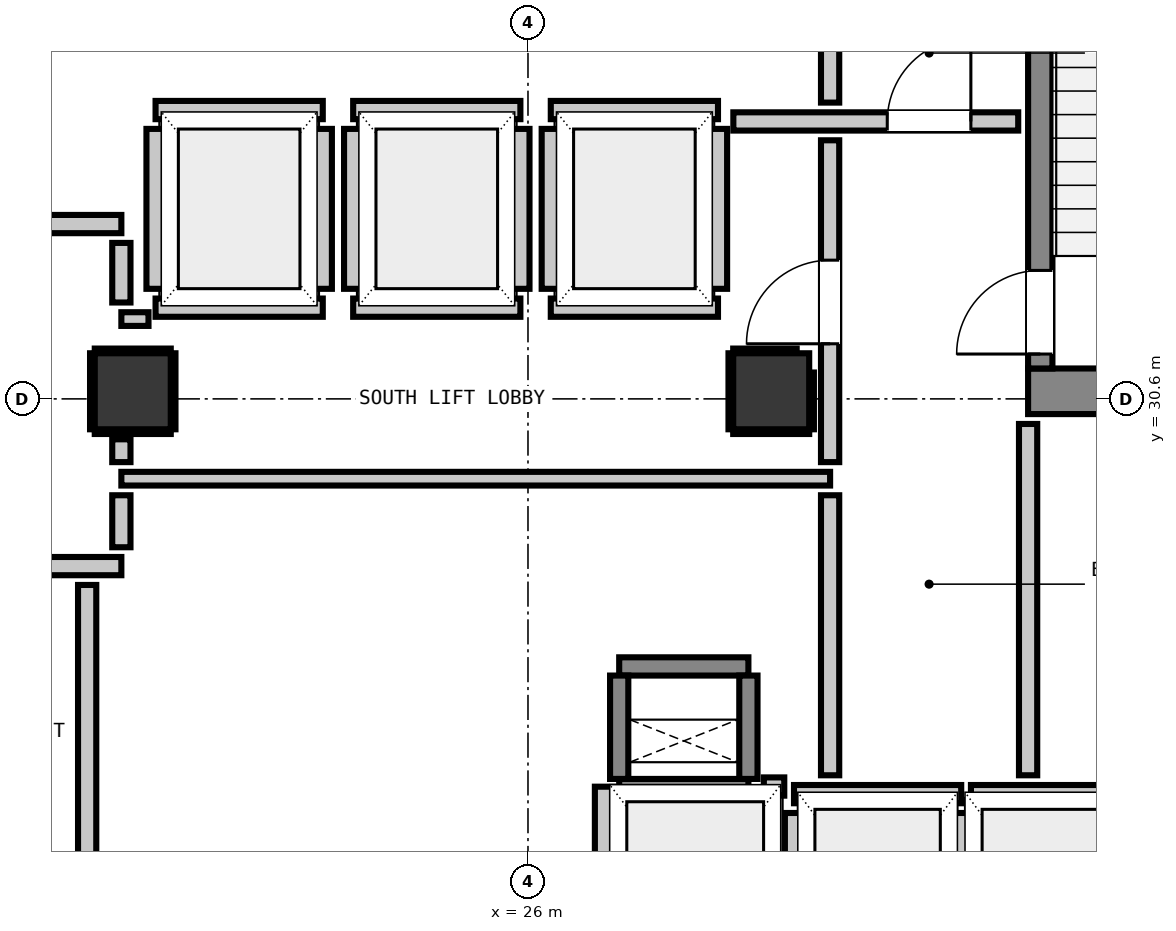
"""IFC4 building model, lengths in metres.
Left out: names, types, materials, properties, quantities, classifications, styles, units other than length and angle.
Written with IfcOpenShell. Run it as: python <this file> out.ifc"""

import sys

from ifc_helpers import new_model, si_unit, direction, frame, frame_2d, origin, origin_2d, place, context, subcontext, project, spatial, rectangle, extrude, element, fill, save


model = new_model("IFC4")
c1 = context("Model", 3, precision=1e-05, world=origin(), true_north=direction((0.0, 1.0)))
c2 = subcontext(c1, "Body", "Model", "MODEL_VIEW")
j1 = project(units=[si_unit("LENGTHUNIT", "METRE"), si_unit("PLANEANGLEUNIT", "RADIAN")], contexts=[c1])
p1 = place(None, origin())
s1 = spatial("IfcSite", under=j1, at=p1, CompositionType="ELEMENT")
p2 = place(p1, origin())
s2 = spatial("IfcBuilding", under=s1, at=p2, CompositionType="ELEMENT")
p3 = place(p2, frame((0.0, 0.0, 112.72)))
s3 = spatial("IfcBuildingStorey", under=s2, at=p3, CompositionType="ELEMENT", Elevation=112.72)
p4 = place(p3, frame((32.58, 30.7, 0.0), z_axis=(0.0, 0.0, 1.0), x_axis=(1.0, 0.0, 0.0)))
e1 = element("IfcWall", 1, at=p4, inside=s3, PredefinedType="SHEAR", context=c2, shape_type="SweptSolid", body=[
    extrude(rectangle(XDim=3.415, YDim=0.6, at=frame_2d((1.708, 0.0))), origin(), (0.0, 0.0, 1.0), 3.32),
])
p5 = place(p3, frame((32.74, 31.0, 0.0), z_axis=(0.0, 0.0, 1.0), x_axis=(0.0, 1.0, 0.0)))
e2 = element("IfcWall", 2, at=p5, inside=s3, PredefinedType="SHEAR", context=c2, shape_type="SweptSolid", body=[
    extrude(rectangle(XDim=7.8, YDim=0.32, at=frame_2d((3.9, 0.0))), origin(), (0.0, 0.0, 1.0), 3.32),
])
p6 = place(p5, frame((0.19, 0.0, 0.0)))
e3 = element("IfcOpeningElement", 3, at=p6, cuts=e2, PredefinedType="OPENING", context=c2, shape_type="SweptSolid", body=[
    extrude(rectangle(XDim=1.1, YDim=2.15, at=frame_2d((0.55, 1.075))), frame((0.0, 0.17, 0.0), z_axis=(0.0, -1.0, 0.0), x_axis=(1.0, 0.0, 0.0)), (0.0, 0.0, 1.0), 0.34),
])
for number, where, z_axis, x_axis in (
    (4, (27.2, 25.48, 0.0), (0.0, 0.0, 1.0), (1.0, 0.0, 0.0)),
    (5, (27.2, 27.08, 0.0), (0.0, 0.0, 1.0), (1.0, 0.0, 0.0)),
):
    element("IfcWall", number, at=place(p3, frame(where, z_axis=z_axis, x_axis=x_axis)), inside=s3, PredefinedType="SHEAR", context=c2, shape_type="SweptSolid", body=[
        extrude(rectangle(XDim=1.7, YDim=0.24, at=frame_2d((0.85, 0.0))), origin(), (0.0, 0.0, 1.0), 3.32),
    ])
for number, where, z_axis, x_axis in (
    (6, (27.2, 25.6, 0.0), (0.0, 0.0, 1.0), (0.0, 1.0, 0.0)),
    (7, (28.9, 25.6, 0.0), (0.0, 0.0, 1.0), (0.0, 1.0, 0.0)),
):
    element("IfcWall", number, at=place(p3, frame(where, z_axis=z_axis, x_axis=x_axis)), inside=s3, PredefinedType="SHEAR", context=c2, shape_type="SweptSolid", body=[
        extrude(rectangle(XDim=1.36, YDim=0.24, at=frame_2d((0.68, 0.0))), origin(), (0.0, 0.0, 1.0), 3.32),
    ])
for number, where, z_axis, x_axis in (
    (8, (20.8, 30.7, 0.0), (0.0, 0.0, 1.0), (1.0, 0.0, 0.0)),
    (9, (29.2, 30.7, 0.0), (0.0, 0.0, 1.0), (1.0, 0.0, 0.0)),
):
    element("IfcColumn", number, at=place(p3, frame(where, z_axis=z_axis, x_axis=x_axis)), inside=s3, PredefinedType="COLUMN", context=c2, shape_type="SweptSolid", body=[
        extrude(rectangle(XDim=1.0, YDim=1.0, at=origin_2d()), origin(), (0.0, 0.0, 1.0), 3.32),
    ])
for number, where, z_axis, x_axis in (
    (10, (21.1, 31.8, 0.0), (0.0, 0.0, 1.0), (1.0, 0.0, 0.0)),
    (11, (21.1, 34.4, 0.0), (0.0, 0.0, 1.0), (1.0, 0.0, 0.0)),
):
    element("IfcWall", number, at=place(p3, frame(where, z_axis=z_axis, x_axis=x_axis)), inside=s3, PredefinedType="PARTITIONING", context=c2, shape_type="SweptSolid", body=[
        extrude(rectangle(XDim=2.2, YDim=0.24, at=frame_2d((1.1, 0.0))), origin(), (0.0, 0.0, 1.0), 3.08),
    ])
p7 = place(p3, frame((21.1, 32.048, 0.0), z_axis=(0.0, 0.0, 1.0), x_axis=(0.0, 1.0, 0.0)))
e12 = element("IfcWall", 12, at=p7, inside=s3, PredefinedType="PARTITIONING", context=c2, shape_type="SweptSolid", body=[
    extrude(rectangle(XDim=2.104, YDim=0.24, at=frame_2d((1.052, 0.0))), origin(), (0.0, 0.0, 1.0), 2.315),
])
p8 = place(p3, frame((23.3, 32.048, 0.0), z_axis=(0.0, 0.0, 1.0), x_axis=(0.0, 1.0, 0.0)))
e13 = element("IfcWall", 13, at=p8, inside=s3, PredefinedType="PARTITIONING", context=c2, shape_type="SweptSolid", body=[
    extrude(rectangle(XDim=2.104, YDim=0.24, at=frame_2d((1.052, 0.0))), origin(), (0.0, 0.0, 1.0), 3.08),
])
for number, where, z_axis, x_axis in (
    (14, (23.7, 31.8, 0.0), (0.0, 0.0, 1.0), (1.0, 0.0, 0.0)),
    (15, (23.7, 34.4, 0.0), (0.0, 0.0, 1.0), (1.0, 0.0, 0.0)),
):
    element("IfcWall", number, at=place(p3, frame(where, z_axis=z_axis, x_axis=x_axis)), inside=s3, PredefinedType="PARTITIONING", context=c2, shape_type="SweptSolid", body=[
        extrude(rectangle(XDim=2.2, YDim=0.24, at=frame_2d((1.1, 0.0))), origin(), (0.0, 0.0, 1.0), 3.08),
    ])
for number, where, z_axis, x_axis in (
    (16, (23.7, 32.048, 0.0), (0.0, 0.0, 1.0), (0.0, 1.0, 0.0)),
    (17, (25.9, 32.048, 0.0), (0.0, 0.0, 1.0), (0.0, 1.0, 0.0)),
):
    element("IfcWall", number, at=place(p3, frame(where, z_axis=z_axis, x_axis=x_axis)), inside=s3, PredefinedType="PARTITIONING", context=c2, shape_type="SweptSolid", body=[
        extrude(rectangle(XDim=2.104, YDim=0.24, at=frame_2d((1.052, 0.0))), origin(), (0.0, 0.0, 1.0), 3.08),
    ])
for number, where, z_axis, x_axis in (
    (18, (26.3, 31.8, 0.0), (0.0, 0.0, 1.0), (1.0, 0.0, 0.0)),
    (19, (26.3, 34.4, 0.0), (0.0, 0.0, 1.0), (1.0, 0.0, 0.0)),
):
    element("IfcWall", number, at=place(p3, frame(where, z_axis=z_axis, x_axis=x_axis)), inside=s3, PredefinedType="PARTITIONING", context=c2, shape_type="SweptSolid", body=[
        extrude(rectangle(XDim=2.2, YDim=0.24, at=frame_2d((1.1, 0.0))), origin(), (0.0, 0.0, 1.0), 3.08),
    ])
for number, where, z_axis, x_axis in (
    (20, (26.3, 32.048, 0.0), (0.0, 0.0, 1.0), (0.0, 1.0, 0.0)),
    (21, (28.5, 32.048, 0.0), (0.0, 0.0, 1.0), (0.0, 1.0, 0.0)),
):
    element("IfcWall", number, at=place(p3, frame(where, z_axis=z_axis, x_axis=x_axis)), inside=s3, PredefinedType="PARTITIONING", context=c2, shape_type="SweptSolid", body=[
        extrude(rectangle(XDim=2.104, YDim=0.24, at=frame_2d((1.052, 0.0))), origin(), (0.0, 0.0, 1.0), 3.08),
    ])
p9 = place(p3, frame((29.5, 25.4, 0.0), z_axis=(0.0, 0.0, 1.0), x_axis=(1.0, 0.0, 0.0)))
e22 = element("IfcWall", 22, at=p9, inside=s3, PredefinedType="PARTITIONING", context=c2, shape_type="SweptSolid", body=[
    extrude(rectangle(XDim=2.2, YDim=0.24, at=frame_2d((1.1, 0.0))), origin(), (0.0, 0.0, 1.0), 3.08),
])
p10 = place(p3, frame((29.5, 22.632, 0.0), z_axis=(0.0, 0.0, 1.0), x_axis=(0.0, 1.0, 0.0)))
e23 = element("IfcWall", 23, at=p10, inside=s3, PredefinedType="PARTITIONING", context=c2, shape_type="SweptSolid", body=[
    extrude(rectangle(XDim=2.52, YDim=0.24, at=frame_2d((1.26, 0.0))), origin(), (0.0, 0.0, 1.0), 2.315),
])
p11 = place(p3, frame((31.7, 22.63, 0.0), z_axis=(0.0, 0.0, 1.0), x_axis=(0.0, 1.0, 0.0)))
e24 = element("IfcWall", 24, at=p11, inside=s3, PredefinedType="PARTITIONING", context=c2, shape_type="SweptSolid", body=[
    extrude(rectangle(XDim=2.522, YDim=0.24, at=frame_2d((1.261, 0.0))), origin(), (0.0, 0.0, 1.0), 3.08),
])
p12 = place(p3, frame((31.828, 25.4, 0.0), z_axis=(0.0, 0.0, 1.0), x_axis=(1.0, 0.0, 0.0)))
e25 = element("IfcWall", 25, at=p12, inside=s3, PredefinedType="PARTITIONING", context=c2, shape_type="SweptSolid", body=[
    extrude(rectangle(XDim=2.072, YDim=0.24, at=frame_2d((1.036, 0.0))), origin(), (0.0, 0.0, 1.0), 3.08),
])
p13 = place(p3, frame((29.103, 25.5, 0.0), z_axis=(0.0, 0.0, 1.0), x_axis=(1.0, 0.0, 0.0)))
e26 = element("IfcWall", 26, at=p13, inside=s3, PredefinedType="PARTITIONING", context=c2, shape_type="SweptSolid", body=[
    extrude(rectangle(XDim=0.269, YDim=0.24, at=frame_2d((0.135, 0.0))), origin(), (0.0, 0.0, 1.0), 3.08),
])
p14 = place(p3, frame((27.0, 22.63, 0.0), z_axis=(0.0, 0.0, 1.0), x_axis=(0.0, 1.0, 0.0)))
e27 = element("IfcWall", 27, at=p14, inside=s3, PredefinedType="PARTITIONING", context=c2, shape_type="SweptSolid", body=[
    extrude(rectangle(XDim=2.868, YDim=0.24, at=frame_2d((1.434, 0.0))), origin(), (0.0, 0.0, 1.0), 3.08),
])
p15 = place(p3, frame((17.45, 28.4, 0.0), z_axis=(0.0, 0.0, 1.0), x_axis=(1.0, 0.0, 0.0)))
e28 = element("IfcWall", 28, at=p15, inside=s3, PredefinedType="PARTITIONING", context=c2, shape_type="SweptSolid", body=[
    extrude(rectangle(XDim=3.2, YDim=0.24, at=frame_2d((1.6, 0.0))), origin(), (0.0, 0.0, 1.0), 3.08),
])
p16 = place(p15, frame((0.784, 0.0, 0.0)))
e29 = element("IfcOpeningElement", 29, at=p16, cuts=e28, PredefinedType="OPENING", context=c2, shape_type="SweptSolid", body=[
    extrude(rectangle(XDim=1.1, YDim=2.15, at=frame_2d((0.55, 1.075))), frame((0.0, 0.13, 0.0), z_axis=(0.0, -1.0, 0.0), x_axis=(1.0, 0.0, 0.0)), (0.0, 0.0, 1.0), 0.26),
])
p17 = place(p3, frame((17.45, 32.9, 0.0), z_axis=(0.0, 0.0, 1.0), x_axis=(1.0, 0.0, 0.0)))
e30 = element("IfcWall", 30, at=p17, inside=s3, PredefinedType="PARTITIONING", context=c2, shape_type="SweptSolid", body=[
    extrude(rectangle(XDim=3.2, YDim=0.24, at=frame_2d((1.6, 0.0))), origin(), (0.0, 0.0, 1.0), 3.08),
])
p18 = place(p17, frame((0.159, 0.0, 0.0)))
e31 = element("IfcOpeningElement", 31, at=p18, cuts=e30, PredefinedType="OPENING", context=c2, shape_type="SweptSolid", body=[
    extrude(rectangle(XDim=1.1, YDim=2.15, at=frame_2d((0.55, 1.075))), frame((0.0, 0.13, 0.0), z_axis=(0.0, -1.0, 0.0), x_axis=(1.0, 0.0, 0.0)), (0.0, 0.0, 1.0), 0.26),
])
p19 = place(p3, frame((28.702, 34.25, 0.0), z_axis=(0.0, 0.0, 1.0), x_axis=(1.0, 0.0, 0.0)))
e32 = element("IfcWall", 32, at=p19, inside=s3, PredefinedType="PARTITIONING", context=c2, shape_type="SweptSolid", body=[
    extrude(rectangle(XDim=3.748, YDim=0.24, at=frame_2d((1.874, 0.0))), origin(), (0.0, 0.0, 1.0), 3.08),
])
p20 = place(p19, frame((2.025, 0.0, 0.0)))
e33 = element("IfcOpeningElement", 33, at=p20, cuts=e32, PredefinedType="OPENING", context=c2, shape_type="SweptSolid", body=[
    extrude(rectangle(XDim=1.1, YDim=2.15, at=frame_2d((0.55, 1.075))), frame((0.0, 0.13, 0.0), z_axis=(0.0, -1.0, 0.0), x_axis=(1.0, 0.0, 0.0)), (0.0, 0.0, 1.0), 0.26),
])
p21 = place(p3, frame((20.65, 29.55, 0.0), z_axis=(0.0, 0.0, 1.0), x_axis=(1.0, 0.0, 0.0)))
e34 = element("IfcWall", 34, at=p21, inside=s3, PredefinedType="PARTITIONING", context=c2, shape_type="SweptSolid", body=[
    extrude(rectangle(XDim=9.325, YDim=0.18, at=frame_2d((4.663, 0.0))), origin(), (0.0, 0.0, 1.0), 3.08),
])
p22 = place(p3, frame((20.65, 31.65, 0.0), z_axis=(0.0, 0.0, 1.0), x_axis=(1.0, 0.0, 0.0)))
e35 = element("IfcWall", 35, at=p22, inside=s3, PredefinedType="PARTITIONING", context=c2, shape_type="SweptSolid", body=[
    extrude(rectangle(XDim=0.357, YDim=0.18, at=frame_2d((0.179, 0.0))), origin(), (0.0, 0.0, 1.0), 3.08),
])
p23 = place(p3, frame((20.2, 22.586, 0.0), z_axis=(0.0, 0.0, 1.0), x_axis=(0.0, 1.0, 0.0)))
e36 = element("IfcWall", 36, at=p23, inside=s3, PredefinedType="PARTITIONING", context=c2, shape_type="SweptSolid", body=[
    extrude(rectangle(XDim=5.566, YDim=0.24, at=frame_2d((2.783, 0.0))), origin(), (0.0, 0.0, 1.0), 3.08),
])
p24 = place(p3, frame((20.65, 28.648, 0.0), z_axis=(0.0, 0.0, 1.0), x_axis=(0.0, 1.0, 0.0)))
e37 = element("IfcWall", 37, at=p24, inside=s3, PredefinedType="PARTITIONING", context=c2, shape_type="SweptSolid", body=[
    extrude(rectangle(XDim=0.684, YDim=0.24, at=frame_2d((0.342, 0.0))), origin(), (0.0, 0.0, 1.0), 2.315),
])
p25 = place(p3, frame((20.65, 29.768, 0.0), z_axis=(0.0, 0.0, 1.0), x_axis=(0.0, 1.0, 0.0)))
e38 = element("IfcWall", 38, at=p25, inside=s3, PredefinedType="PARTITIONING", context=c2, shape_type="SweptSolid", body=[
    extrude(rectangle(XDim=0.3, YDim=0.24, at=frame_2d((0.15, 0.0))), origin(), (0.0, 0.0, 1.0), 2.315),
])
p26 = place(p3, frame((20.65, 31.868, 0.0), z_axis=(0.0, 0.0, 1.0), x_axis=(0.0, 1.0, 0.0)))
e39 = element("IfcWall", 39, at=p26, inside=s3, PredefinedType="PARTITIONING", context=c2, shape_type="SweptSolid", body=[
    extrude(rectangle(XDim=0.784, YDim=0.24, at=frame_2d((0.392, 0.0))), origin(), (0.0, 0.0, 1.0), 2.315),
])
p27 = place(p3, frame((29.975, 25.648, 0.0), z_axis=(0.0, 0.0, 1.0), x_axis=(0.0, 1.0, 0.0)))
e40 = element("IfcWall", 40, at=p27, inside=s3, PredefinedType="PARTITIONING", context=c2, shape_type="SweptSolid", body=[
    extrude(rectangle(XDim=3.684, YDim=0.24, at=frame_2d((1.842, 0.0))), origin(), (0.0, 0.0, 1.0), 3.08),
])
p28 = place(p3, frame((29.975, 29.768, 0.0), z_axis=(0.0, 0.0, 1.0), x_axis=(0.0, 1.0, 0.0)))
e41 = element("IfcWall", 41, at=p28, inside=s3, PredefinedType="PARTITIONING", context=c2, shape_type="SweptSolid", body=[
    extrude(rectangle(XDim=4.234, YDim=0.24, at=frame_2d((2.117, 0.0))), origin(), (0.0, 0.0, 1.0), 3.08),
])
p29 = place(p28, frame((1.557, 0.0, 0.0)))
e42 = element("IfcOpeningElement", 42, at=p29, cuts=e41, PredefinedType="OPENING", context=c2, shape_type="SweptSolid", body=[
    extrude(rectangle(XDim=1.1, YDim=2.15, at=frame_2d((0.55, 1.075))), frame((0.0, 0.13, 0.0), z_axis=(0.0, -1.0, 0.0), x_axis=(1.0, 0.0, 0.0)), (0.0, 0.0, 1.0), 0.26),
])
p30 = place(p3, frame((29.975, 34.498, 0.0), z_axis=(0.0, 0.0, 1.0), x_axis=(0.0, 1.0, 0.0)))
e43 = element("IfcWall", 43, at=p30, inside=s3, PredefinedType="PARTITIONING", context=c2, shape_type="SweptSolid", body=[
    extrude(rectangle(XDim=0.964, YDim=0.24, at=frame_2d((0.482, 0.0))), origin(), (0.0, 0.0, 1.0), 3.08),
])
p31 = place(p3, frame((32.58, 25.648, 0.0), z_axis=(0.0, 0.0, 1.0), x_axis=(0.0, 1.0, 0.0)))
e44 = element("IfcWall", 44, at=p31, inside=s3, PredefinedType="PARTITIONING", context=c2, shape_type="SweptSolid", body=[
    extrude(rectangle(XDim=4.622, YDim=0.24, at=frame_2d((2.311, 0.0))), origin(), (0.0, 0.0, 1.0), 3.08),
])
for number, where, z_axis, x_axis in (
    (45, (20.3, 30.168, 0.0), (0.0, 0.0, 1.0), (1.0, 0.0, 0.0)),
    (46, (20.3, 31.232, 0.0), (0.0, 0.0, 1.0), (1.0, 0.0, 0.0)),
    (47, (20.268, 30.2, 0.0), (0.0, 0.0, 1.0), (0.0, 1.0, 0.0)),
    (48, (21.332, 30.2, 0.0), (0.0, 0.0, 1.0), (0.0, 1.0, 0.0)),
    (49, (28.7, 30.168, 0.0), (0.0, 0.0, 1.0), (1.0, 0.0, 0.0)),
):
    element("IfcWall", number, at=place(p3, frame(where, z_axis=z_axis, x_axis=x_axis)), inside=s3, PredefinedType="PARTITIONING", context=c2, shape_type="SweptSolid", body=[
        extrude(rectangle(XDim=1.0, YDim=0.06, at=frame_2d((0.5, 0.0))), origin(), (0.0, 0.0, 1.0), 1.45),
    ])
p32 = place(p3, frame((28.7, 31.232, 0.0), z_axis=(0.0, 0.0, 1.0), x_axis=(1.0, 0.0, 0.0)))
e50 = element("IfcWall", 50, at=p32, inside=s3, PredefinedType="PARTITIONING", context=c2, shape_type="SweptSolid", body=[
    extrude(rectangle(XDim=0.835, YDim=0.06, at=frame_2d((0.417, 0.0))), origin(), (0.0, 0.0, 1.0), 1.45),
])
p33 = place(p3, frame((28.668, 30.2, 0.0), z_axis=(0.0, 0.0, 1.0), x_axis=(0.0, 1.0, 0.0)))
e51 = element("IfcWall", 51, at=p33, inside=s3, PredefinedType="PARTITIONING", context=c2, shape_type="SweptSolid", body=[
    extrude(rectangle(XDim=1.0, YDim=0.06, at=frame_2d((0.5, 0.0))), origin(), (0.0, 0.0, 1.0), 1.45),
])
p34 = place(p3, frame((29.732, 30.2, 0.0), z_axis=(0.0, 0.0, 1.0), x_axis=(0.0, 1.0, 0.0)))
e52 = element("IfcWall", 52, at=p34, inside=s3, PredefinedType="PARTITIONING", context=c2, shape_type="SweptSolid", body=[
    extrude(rectangle(XDim=0.747, YDim=0.06, at=frame_2d((0.374, 0.0))), origin(), (0.0, 0.0, 1.0), 1.45),
])
p35 = place(p6, origin())
e53 = element("IfcDoor", 53, at=p35, inside=s3, OperationType="SINGLE_SWING_LEFT", PredefinedType="DOOR", context=c2, shape_type="SweptSolid", body=[
    extrude(rectangle(XDim=1.1, YDim=2.15, at=frame_2d((0.55, 1.075))), frame((0.0, 0.025, 0.0), z_axis=(0.0, -1.0, 0.0), x_axis=(1.0, 0.0, 0.0)), (0.0, 0.0, 1.0), 0.05),
])
fill(e3, e53)
p36 = place(p29, origin())
e54 = element("IfcDoor", 54, at=p36, inside=s3, OperationType="SINGLE_SWING_LEFT", PredefinedType="DOOR", context=c2, shape_type="SweptSolid", body=[
    extrude(rectangle(XDim=1.1, YDim=2.15, at=frame_2d((0.55, 1.075))), frame((0.0, 0.025, 0.0), z_axis=(0.0, -1.0, 0.0), x_axis=(1.0, 0.0, 0.0)), (0.0, 0.0, 1.0), 0.05),
])
fill(e42, e54)
p37 = place(p20, origin())
e55 = element("IfcDoor", 55, at=p37, inside=s3, OperationType="SINGLE_SWING_RIGHT", PredefinedType="DOOR", context=c2, shape_type="SweptSolid", body=[
    extrude(rectangle(XDim=1.1, YDim=2.15, at=frame_2d((0.55, 1.075))), frame((0.0, 0.025, 0.0), z_axis=(0.0, -1.0, 0.0), x_axis=(1.0, 0.0, 0.0)), (0.0, 0.0, 1.0), 0.05),
])
fill(e33, e55)
save(model, sys.argv[1])
